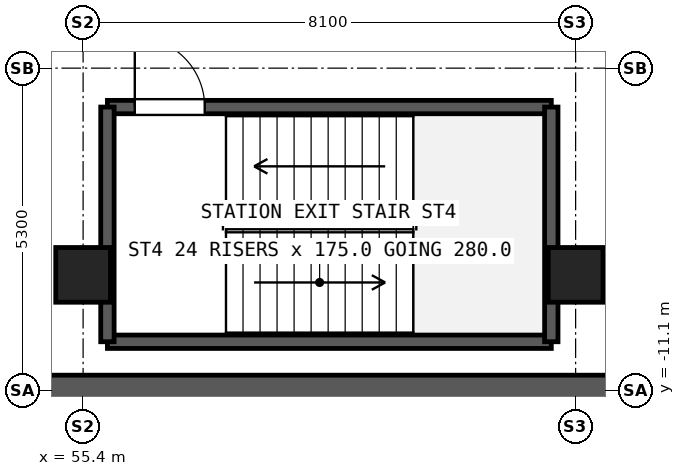
"""IFC4 building model, lengths in metres.
Left out: names, types, materials, properties, quantities, classifications, styles, units other than length and angle.
Written with IfcOpenShell. Run it as: python <this file> out.ifc"""

import sys

from ifc_helpers import new_model, si_unit, direction, frame, frame_2d, origin, origin_2d, place, context, subcontext, project, spatial, rectangle, hollow_rectangle, extrude, source, transform, mapped, element, fill, save


model = new_model("IFC4")
c1 = context("Model", 3, precision=1e-05, world=origin(), true_north=direction((0.0, 1.0)))
c2 = subcontext(c1, "Body", "Model", "MODEL_VIEW")
j1 = project(units=[si_unit("LENGTHUNIT", "METRE"), si_unit("PLANEANGLEUNIT", "RADIAN")], contexts=[c1])
p1 = place(None, origin())
s1 = spatial("IfcSite", under=j1, at=p1, CompositionType="ELEMENT")
p2 = place(p1, origin())
s2 = spatial("IfcBuilding", under=s1, at=p2, CompositionType="ELEMENT")
p3 = place(p2, frame((0.0, 0.0, -8.4)))
s3 = spatial("IfcBuildingStorey", under=s2, at=p3, CompositionType="ELEMENT", Elevation=-8.4)
m1 = source(origin(), c2, "Body", "SweptSolid", [
    extrude(hollow_rectangle(XDim=0.7, YDim=0.9, WallThickness=0.04, at=origin_2d()), origin(), (0.0, 0.0, 1.0), 3.88),
])
for number, where, z_axis, x_axis in (
    (1, (55.4, -9.2, 0.0), (0.0, 0.0, 1.0), (1.0, 0.0, 0.0)),
    (2, (63.5, -9.2, 0.0), (0.0, 0.0, 1.0), (1.0, 0.0, 0.0)),
):
    element("IfcColumn", number, at=place(p3, frame(where, z_axis=z_axis, x_axis=x_axis)), inside=s3, PredefinedType="COLUMN", context=c2, shape_type="MappedRepresentation", body=[
        mapped(m1, transform((0.0, 0.0, 0.0), x_axis=(1.0, 0.0, 0.0), y_axis=(0.0, 1.0, 0.0), z_axis=(0.0, 0.0, 1.0), scale=1.0)),
    ])
p4 = place(p3, frame((0.0, -11.1, 0.0), z_axis=(0.0, 0.0, 1.0), x_axis=(1.0, 0.0, 0.0)))
e3 = element("IfcWall", 3, at=p4, inside=s3, PredefinedType="USERDEFINED", context=c2, shape_type="SweptSolid", body=[
    extrude(rectangle(XDim=71.6, YDim=0.5, at=frame_2d((35.8, 0.0))), origin(), (0.0, 0.0, 1.0), 3.88),
])
p5 = place(p3, frame((55.8, -10.3, 0.0), z_axis=(0.0, 0.0, 1.0), x_axis=(1.0, 0.0, 0.0)))
e4 = element("IfcWall", 4, at=p5, inside=s3, PredefinedType="SOLIDWALL", context=c2, shape_type="SweptSolid", body=[
    extrude(rectangle(XDim=7.3, YDim=0.22, at=frame_2d((3.65, 0.0))), origin(), (0.0, 0.0, 1.0), 3.88),
])
p6 = place(p3, frame((55.8, -6.44, 0.0), z_axis=(0.0, 0.0, 1.0), x_axis=(1.0, 0.0, 0.0)))
e5 = element("IfcWall", 5, at=p6, inside=s3, PredefinedType="SOLIDWALL", context=c2, shape_type="SweptSolid", body=[
    extrude(rectangle(XDim=7.3, YDim=0.22, at=frame_2d((3.65, 0.0))), origin(), (0.0, 0.0, 1.0), 3.88),
])
p7 = place(p6, frame((0.45, 0.0, 0.0)))
e6 = element("IfcOpeningElement", 6, at=p7, cuts=e5, PredefinedType="OPENING", context=c2, shape_type="SweptSolid", body=[
    extrude(rectangle(XDim=1.15, YDim=2.2, at=frame_2d((0.575, 1.1))), frame((0.0, 0.12, 0.0), z_axis=(0.0, -1.0, 0.0), x_axis=(1.0, 0.0, 0.0)), (0.0, 0.0, 1.0), 0.24),
])
for number, where, z_axis, x_axis in (
    (7, (55.8, -10.3, 0.0), (0.0, 0.0, 1.0), (0.0, 1.0, 0.0)),
    (8, (63.1, -10.3, 0.0), (0.0, 0.0, 1.0), (0.0, 1.0, 0.0)),
):
    element("IfcWall", number, at=place(p3, frame(where, z_axis=z_axis, x_axis=x_axis)), inside=s3, PredefinedType="SOLIDWALL", context=c2, shape_type="SweptSolid", body=[
        extrude(rectangle(XDim=3.86, YDim=0.22, at=frame_2d((1.93, 0.0))), origin(), (0.0, 0.0, 1.0), 3.88),
    ])
p8 = place(p7, origin())
e9 = element("IfcDoor", 9, at=p8, inside=s3, OperationType="SINGLE_SWING_LEFT", PredefinedType="DOOR", context=c2, shape_type="SweptSolid", body=[
    extrude(rectangle(XDim=1.15, YDim=2.2, at=frame_2d((0.575, 1.1))), frame((0.0, 0.025, 0.0), z_axis=(0.0, -1.0, 0.0), x_axis=(1.0, 0.0, 0.0)), (0.0, 0.0, 1.0), 0.05),
])
fill(e6, e9)
save(model, sys.argv[1])
